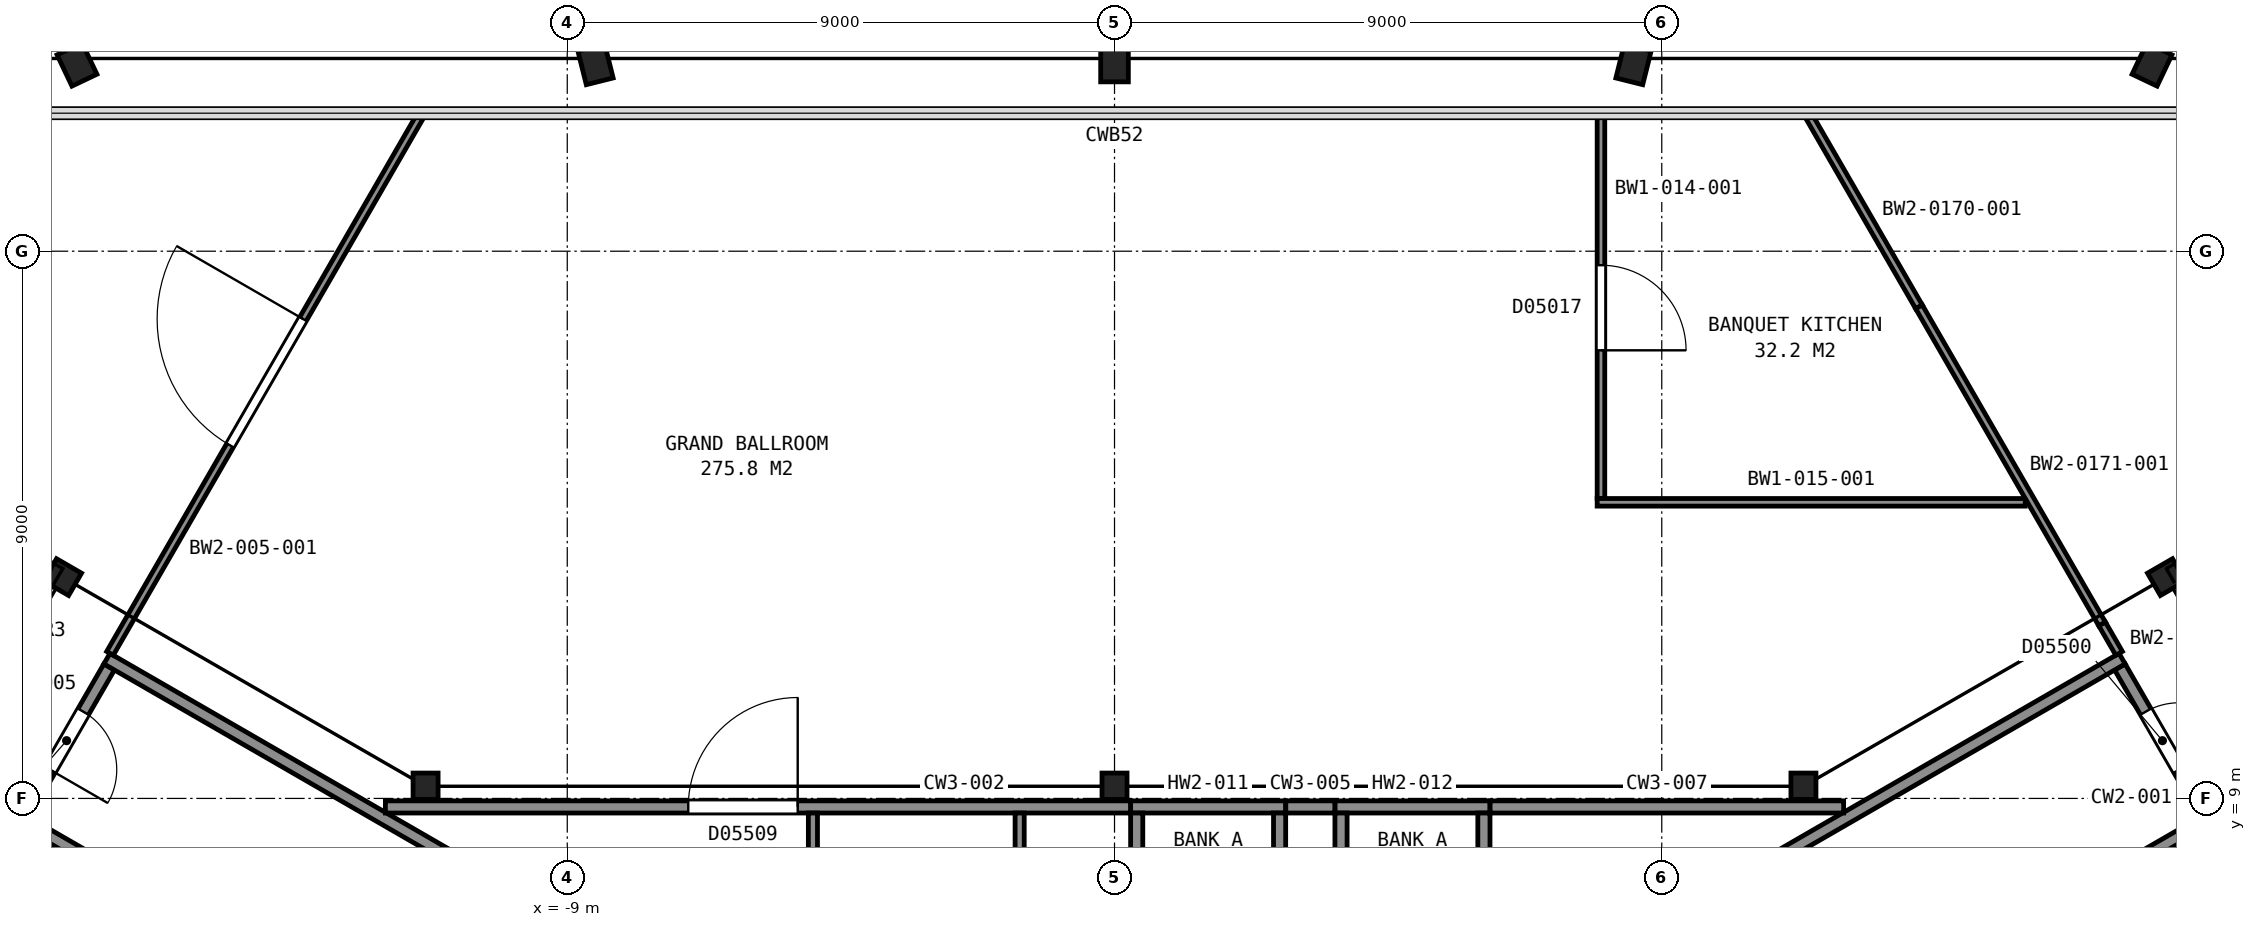
"""IFC4 building model, lengths in metres.
Left out: names, types, materials, properties, quantities, classifications, styles, units other than length and angle.
Written with IfcOpenShell. Run it as: python <this file> out.ifc"""

import sys

from ifc_helpers import new_model, si_unit, direction, frame, frame_2d, origin, origin_2d, place, context, subcontext, project, spatial, rectangle, i_section, extrude, element, fill, save


model = new_model("IFC4")
c1 = context("Model", 3, precision=1e-05, world=origin(), true_north=direction((0.0, 1.0)))
c2 = subcontext(c1, "Body", "Model", "MODEL_VIEW")
j1 = project(units=[si_unit("LENGTHUNIT", "METRE"), si_unit("PLANEANGLEUNIT", "RADIAN")], contexts=[c1])
p1 = place(None, origin())
s1 = spatial("IfcSite", under=j1, at=p1, CompositionType="ELEMENT")
p2 = place(p1, origin())
s2 = spatial("IfcBuilding", under=s1, at=p2, CompositionType="ELEMENT")
p3 = place(p2, frame((0.0, 0.0, 32.0)))
s3 = spatial("IfcBuildingStorey", under=s2, at=p3, CompositionType="ELEMENT", Elevation=32.0)
p4 = place(p3, frame((17.109, 21.167, 0.03), z_axis=(-0.039441005649, -0.082985106815, 0.995769993081), x_axis=(0.999217228346, -0.000227977802, 0.039558546511)))
e1 = element("IfcColumn", 1, at=p4, inside=s3, PredefinedType="COLUMN", context=c2, shape_type="SweptSolid", body=[
    extrude(i_section(OverallWidth=0.455, OverallDepth=0.569, WebThickness=0.078, FlangeThickness=0.125, FilletRadius=0.015, at=origin_2d()), origin(), (0.0, 0.0, 1.0), 4.76),
])
p5 = place(p3, frame((8.56, 21.168, 0.025), z_axis=(-0.020791051327, -0.083010576852, 0.996331760166), x_axis=(0.999783003146, -0.000434756363, 0.020826848233)))
e2 = element("IfcColumn", 2, at=p5, inside=s3, PredefinedType="COLUMN", context=c2, shape_type="SweptSolid", body=[
    extrude(i_section(OverallWidth=0.455, OverallDepth=0.569, WebThickness=0.078, FlangeThickness=0.125, FilletRadius=0.015, at=origin_2d()), origin(), (0.0, 0.0, 1.0), 4.768),
])
p6 = place(p3, frame((0.0, 21.168, 0.025), z_axis=(0.0, -0.083028524071, 0.996547171082), x_axis=(1.0, 0.0, 0.0)))
e3 = element("IfcColumn", 3, at=p6, inside=s3, PredefinedType="COLUMN", context=c2, shape_type="SweptSolid", body=[
    extrude(i_section(OverallWidth=0.455, OverallDepth=0.569, WebThickness=0.078, FlangeThickness=0.125, FilletRadius=0.015, at=origin_2d()), origin(), (0.0, 0.0, 1.0), 4.766),
])
p7 = place(p3, frame((-8.56, 21.168, 0.025), z_axis=(0.020791051327, -0.083010576852, 0.996331760166), x_axis=(0.999783003146, 0.000434756363, -0.020826848233)))
e4 = element("IfcColumn", 4, at=p7, inside=s3, PredefinedType="COLUMN", context=c2, shape_type="SweptSolid", body=[
    extrude(i_section(OverallWidth=0.455, OverallDepth=0.569, WebThickness=0.078, FlangeThickness=0.125, FilletRadius=0.015, at=origin_2d()), origin(), (0.0, 0.0, 1.0), 4.768),
])
p8 = place(p3, frame((-17.109, 21.167, 0.03), z_axis=(0.039441005649, -0.082985106815, 0.995769993081), x_axis=(0.999217228346, 0.000227977802, -0.039558546511)))
e5 = element("IfcColumn", 5, at=p8, inside=s3, PredefinedType="COLUMN", context=c2, shape_type="SweptSolid", body=[
    extrude(i_section(OverallWidth=0.455, OverallDepth=0.569, WebThickness=0.078, FlangeThickness=0.125, FilletRadius=0.015, at=origin_2d()), origin(), (0.0, 0.0, 1.0), 4.76),
])
p9 = place(p3, frame((17.3, 12.64, 0.0), z_axis=(0.0, 0.0, 1.0), x_axis=(0.5, -0.866025403784, 0.0)))
e6 = element("IfcColumn", 6, at=p9, inside=s3, PredefinedType="COLUMN", context=c2, shape_type="SweptSolid", body=[
    extrude(i_section(OverallWidth=0.424, OverallDepth=0.475, WebThickness=0.048, FlangeThickness=0.077, FilletRadius=0.015, at=origin_2d()), origin(), (0.0, 0.0, 1.0), 4.8),
])
for number, where, z_axis, x_axis in (
    (7, (11.33, 9.2, 0.0), (0.0, 0.0, 1.0), (1.0, 0.0, 0.0)),
    (8, (0.0, 9.2, 0.0), (0.0, 0.0, 1.0), (1.0, 0.0, 0.0)),
    (9, (-11.33, 9.2, 0.0), (0.0, 0.0, 1.0), (1.0, 0.0, 0.0)),
):
    element("IfcColumn", number, at=place(p3, frame(where, z_axis=z_axis, x_axis=x_axis)), inside=s3, PredefinedType="COLUMN", context=c2, shape_type="SweptSolid", body=[
        extrude(i_section(OverallWidth=0.411, OverallDepth=0.434, WebThickness=0.036, FlangeThickness=0.057, FilletRadius=0.015, at=origin_2d()), origin(), (0.0, 0.0, 1.0), 4.8),
    ])
p10 = place(p3, frame((-17.3, 12.64, 0.0), z_axis=(0.0, 0.0, 1.0), x_axis=(0.5, 0.866025403784, 0.0)))
e10 = element("IfcColumn", 10, at=p10, inside=s3, PredefinedType="COLUMN", context=c2, shape_type="SweptSolid", body=[
    extrude(i_section(OverallWidth=0.424, OverallDepth=0.475, WebThickness=0.048, FlangeThickness=0.077, FilletRadius=0.015, at=origin_2d()), origin(), (0.0, 0.0, 1.0), 4.8),
])
p11 = place(p3, frame((17.934, 8.738, 0.0), z_axis=(0.0, 0.0, 1.0), x_axis=(-0.49998411664, 0.866034573852, 0.0)))
e11 = element("IfcWall", 11, at=p11, inside=s3, PredefinedType="PARTITIONING", context=c2, shape_type="SweptSolid", body=[
    extrude(rectangle(XDim=2.8, YDim=0.2, at=frame_2d((1.4, 0.0))), origin(), (0.0, 0.0, 1.0), 4.55),
])
p12 = place(p11, frame((0.85, 0.0, 0.0)))
e12 = element("IfcOpeningElement", 12, at=p12, cuts=e11, PredefinedType="OPENING", context=c2, shape_type="SweptSolid", body=[
    extrude(rectangle(XDim=1.1, YDim=2.1, at=frame_2d((0.55, 1.05))), frame((0.0, 0.11, 0.0), z_axis=(0.0, -1.0, 0.0), x_axis=(1.0, 0.0, 0.0)), (0.0, 0.0, 1.0), 0.22),
])
for number, where, z_axis, x_axis in (
    (13, (6.178, 5.299, 0.0), (0.0, 0.0, 1.0), (0.866, 0.5, 0.0)),
    (14, (7.678, 2.701, 0.0), (0.0, 0.0, 1.0), (0.866, 0.5, 0.0)),
):
    element("IfcWall", number, at=place(p3, frame(where, z_axis=z_axis, x_axis=x_axis)), inside=s3, PredefinedType="PARTITIONING", context=c2, shape_type="SweptSolid", body=[
        extrude(rectangle(XDim=12.0, YDim=0.2, at=frame_2d((6.0, 0.0))), origin(), (0.0, 0.0, 1.0), 4.55),
    ])
p13 = place(p3, frame((-16.534, 11.162, 0.0), z_axis=(0.0, 0.0, 1.0), x_axis=(-0.49998411664, -0.866034573852, 0.0)))
e15 = element("IfcWall", 15, at=p13, inside=s3, PredefinedType="PARTITIONING", context=c2, shape_type="SweptSolid", body=[
    extrude(rectangle(XDim=2.8, YDim=0.2, at=frame_2d((1.4, 0.0))), origin(), (0.0, 0.0, 1.0), 4.55),
])
p14 = place(p13, frame((0.85, 0.0, 0.0)))
e16 = element("IfcOpeningElement", 16, at=p14, cuts=e15, PredefinedType="OPENING", context=c2, shape_type="SweptSolid", body=[
    extrude(rectangle(XDim=1.1, YDim=2.1, at=frame_2d((0.55, 1.05))), frame((0.0, 0.11, 0.0), z_axis=(0.0, -1.0, 0.0), x_axis=(1.0, 0.0, 0.0)), (0.0, 0.0, 1.0), 0.22),
])
for number, where, z_axis, x_axis in (
    (17, (-7.678, 2.701, 0.0), (0.0, 0.0, 1.0), (-0.866, 0.5, 0.0)),
    (18, (-6.178, 5.299, 0.0), (0.0, 0.0, 1.0), (-0.866, 0.5, 0.0)),
):
    element("IfcWall", number, at=place(p3, frame(where, z_axis=z_axis, x_axis=x_axis)), inside=s3, PredefinedType="PARTITIONING", context=c2, shape_type="SweptSolid", body=[
        extrude(rectangle(XDim=12.0, YDim=0.2, at=frame_2d((6.0, 0.0))), origin(), (0.0, 0.0, 1.0), 4.55),
    ])
for number, where, z_axis, x_axis in (
    (19, (0.265, 8.86, 0.0), (0.0, 0.0, 1.0), (1.0, 0.0, 0.0)),
    (20, (3.625, 8.86, 0.0), (0.0, 0.0, 1.0), (1.0, 0.0, 0.0)),
):
    element("IfcWall", number, at=place(p3, frame(where, z_axis=z_axis, x_axis=x_axis)), inside=s3, PredefinedType="PARTITIONING", context=c2, shape_type="SweptSolid", body=[
        extrude(rectangle(XDim=2.55, YDim=0.2, at=frame_2d((1.275, 0.0))), origin(), (0.0, 0.0, 1.0), 4.8),
    ])
for number, where, z_axis, x_axis in (
    (21, (6.075, 7.01, 0.0), (0.0, 0.0, 1.0), (0.0, 1.0, 0.0)),
    (22, (3.725, 7.01, 0.0), (0.0, 0.0, 1.0), (0.0, 1.0, 0.0)),
    (23, (2.715, 7.01, 0.0), (0.0, 0.0, 1.0), (0.0, 1.0, 0.0)),
    (24, (0.365, 7.01, 0.0), (0.0, 0.0, 1.0), (0.0, 1.0, 0.0)),
):
    element("IfcWall", number, at=place(p3, frame(where, z_axis=z_axis, x_axis=x_axis)), inside=s3, PredefinedType="PARTITIONING", context=c2, shape_type="SweptSolid", body=[
        extrude(rectangle(XDim=1.75, YDim=0.2, at=frame_2d((0.875, 0.0))), origin(), (0.0, 0.0, 1.0), 4.8),
    ])
p15 = place(p3, frame((0.263, 8.86, 0.0), z_axis=(0.0, 0.0, 1.0), x_axis=(-1.0, 0.0, 0.0)))
e25 = element("IfcWall", 25, at=p15, inside=s3, PredefinedType="PARTITIONING", context=c2, shape_type="SweptSolid", body=[
    extrude(rectangle(XDim=12.254, YDim=0.2, at=frame_2d((6.127, 0.0))), origin(), (0.0, 0.0, 1.0), 4.55),
])
p16 = place(p15, frame((5.473, 0.0, 0.0)))
e26 = element("IfcOpeningElement", 26, at=p16, cuts=e25, PredefinedType="OPENING", context=c2, shape_type="SweptSolid", body=[
    extrude(rectangle(XDim=1.8, YDim=2.1, at=frame_2d((0.9, 1.05))), frame((0.0, 0.11, 0.0), z_axis=(0.0, -1.0, 0.0), x_axis=(1.0, 0.0, 0.0)), (0.0, 0.0, 1.0), 0.22),
])
p17 = place(p3, frame((-4.96, 7.762, 0.0), z_axis=(0.0, 0.0, 1.0), x_axis=(0.0, 1.0, 0.0)))
e27 = element("IfcWall", 27, at=p17, inside=s3, PredefinedType="PARTITIONING", context=c2, shape_type="SweptSolid", body=[
    extrude(rectangle(XDim=0.998, YDim=0.15, at=frame_2d((0.499, 0.0))), origin(), (0.0, 0.0, 1.0), 4.55),
])
p18 = place(p3, frame((-1.56, 6.635, 0.0), z_axis=(0.0, 0.0, 1.0), x_axis=(0.0, 1.0, 0.0)))
e28 = element("IfcWall", 28, at=p18, inside=s3, PredefinedType="PARTITIONING", context=c2, shape_type="SweptSolid", body=[
    extrude(rectangle(XDim=2.125, YDim=0.15, at=frame_2d((1.062, 0.0))), origin(), (0.0, 0.0, 1.0), 4.55),
])
p19 = place(p18, frame((0.625, 0.0, 0.0)))
e29 = element("IfcOpeningElement", 29, at=p19, cuts=e28, PredefinedType="OPENING", context=c2, shape_type="SweptSolid", body=[
    extrude(rectangle(XDim=0.9, YDim=2.1, at=frame_2d((0.45, 1.05))), frame((0.0, 0.085, 0.0), z_axis=(0.0, -1.0, 0.0), x_axis=(1.0, 0.0, 0.0)), (0.0, 0.0, 1.0), 0.17),
])
p20 = place(p3, frame((2.817, 8.86, 0.0), z_axis=(0.0, 0.0, 1.0), x_axis=(1.0, 0.0, 0.0)))
e30 = element("IfcWall", 30, at=p20, inside=s3, PredefinedType="PARTITIONING", context=c2, shape_type="SweptSolid", body=[
    extrude(rectangle(XDim=0.806, YDim=0.2, at=frame_2d((0.403, 0.0))), origin(), (0.0, 0.0, 1.0), 4.55),
])
p21 = place(p3, frame((6.177, 8.86, 0.0), z_axis=(0.0, 0.0, 1.0), x_axis=(1.0, 0.0, 0.0)))
e31 = element("IfcWall", 31, at=p21, inside=s3, PredefinedType="PARTITIONING", context=c2, shape_type="SweptSolid", body=[
    extrude(rectangle(XDim=5.814, YDim=0.2, at=frame_2d((2.907, 0.0))), origin(), (0.0, 0.0, 1.0), 4.55),
])
p22 = place(p3, frame((-11.391, 20.27, 0.0), z_axis=(0.0, 0.0, 1.0), x_axis=(-0.499978599175, -0.866037759204, 0.0)))
e32 = element("IfcWall", 32, at=p22, inside=s3, PredefinedType="PARTITIONING", context=c2, shape_type="SweptSolid", body=[
    extrude(rectangle(XDim=10.258, YDim=0.125, at=frame_2d((5.129, 0.0))), origin(), (0.0, 0.0, 1.0), 3.793),
])
p23 = place(p22, frame((3.908, 0.0, 0.0)))
e33 = element("IfcOpeningElement", 33, at=p23, cuts=e32, PredefinedType="OPENING", context=c2, shape_type="SweptSolid", body=[
    extrude(rectangle(XDim=2.4, YDim=2.4, at=frame_2d((1.2, 1.2))), frame((0.0, 0.073, 0.0), z_axis=(0.0, -1.0, 0.0), x_axis=(1.0, 0.0, 0.0)), (0.0, 0.0, 1.0), 0.145),
])
p24 = place(p3, frame((8.0, 20.27, 0.0), z_axis=(0.0, 0.0, 1.0), x_axis=(0.0, -1.0, 0.0)))
e34 = element("IfcWall", 34, at=p24, inside=s3, PredefinedType="PARTITIONING", context=c2, shape_type="SweptSolid", body=[
    extrude(rectangle(XDim=6.335, YDim=0.125, at=frame_2d((3.167, 0.0))), origin(), (0.0, 0.0, 1.0), 4.64),
])
p25 = place(p24, frame((2.5, 0.0, 0.0)))
e35 = element("IfcOpeningElement", 35, at=p25, cuts=e34, PredefinedType="OPENING", context=c2, shape_type="SweptSolid", body=[
    extrude(rectangle(XDim=1.4, YDim=2.1, at=frame_2d((0.7, 1.05))), frame((0.0, 0.073, 0.0), z_axis=(0.0, -1.0, 0.0), x_axis=(1.0, 0.0, 0.0)), (0.0, 0.0, 1.0), 0.145),
])
p26 = place(p3, frame((7.938, 13.87, 0.0), z_axis=(0.0, 0.0, 1.0), x_axis=(1.0, 0.0, 0.0)))
e36 = element("IfcWall", 36, at=p26, inside=s3, PredefinedType="PARTITIONING", context=c2, shape_type="SweptSolid", body=[
    extrude(rectangle(XDim=7.04, YDim=0.125, at=frame_2d((3.52, 0.0))), origin(), (0.0, 0.0, 1.0), 4.64),
])
p27 = place(p3, frame((11.391, 20.27, 0.0), z_axis=(0.0, 0.0, 1.0), x_axis=(0.500036521051, -0.866004317319, 0.0)))
e37 = element("IfcWall", 37, at=p27, inside=s3, PredefinedType="PARTITIONING", context=c2, shape_type="SweptSolid", body=[
    extrude(rectangle(XDim=3.678, YDim=0.125, at=frame_2d((1.839, 0.0))), origin(), (0.0, 0.0, 1.0), 4.64),
])
p28 = place(p3, frame((13.23, 17.084, 0.0), z_axis=(0.0, 0.0, 1.0), x_axis=(0.500062816623, -0.865989133553, 0.0)))
e38 = element("IfcWall", 38, at=p28, inside=s3, PredefinedType="PARTITIONING", context=c2, shape_type="SweptSolid", body=[
    extrude(rectangle(XDim=6.023, YDim=0.125, at=frame_2d((3.011, 0.0))), origin(), (0.0, 0.0, 1.0), 3.793),
])
p29 = place(p3, frame((16.242, 11.869, 0.0), z_axis=(0.0, 0.0, 1.0), x_axis=(0.500000383388, -0.866025182435, 0.0)))
e39 = element("IfcWall", 39, at=p29, inside=s3, PredefinedType="PARTITIONING", context=c2, shape_type="SweptSolid", body=[
    extrude(rectangle(XDim=0.558, YDim=0.125, at=frame_2d((0.279, 0.0))), origin(), (0.0, 0.0, 1.0), 4.64),
])
p30 = place(p12, origin())
e40 = element("IfcDoor", 40, at=p30, inside=s3, OperationType="SINGLE_SWING_LEFT", PredefinedType="DOOR", context=c2, shape_type="SweptSolid", body=[
    extrude(rectangle(XDim=1.1, YDim=2.1, at=frame_2d((0.55, 1.05))), frame((0.0, 0.025, 0.0), z_axis=(0.0, -1.0, 0.0), x_axis=(1.0, 0.0, 0.0)), (0.0, 0.0, 1.0), 0.05),
])
fill(e12, e40)
p31 = place(p14, origin())
e41 = element("IfcDoor", 41, at=p31, inside=s3, OperationType="SINGLE_SWING_RIGHT", PredefinedType="DOOR", context=c2, shape_type="SweptSolid", body=[
    extrude(rectangle(XDim=1.1, YDim=2.1, at=frame_2d((0.55, 1.05))), frame((0.0, 0.025, 0.0), z_axis=(0.0, -1.0, 0.0), x_axis=(1.0, 0.0, 0.0)), (0.0, 0.0, 1.0), 0.05),
])
fill(e16, e41)
p32 = place(p16, origin())
e42 = element("IfcDoor", 42, at=p32, inside=s3, OperationType="DOUBLE_DOOR_SINGLE_SWING", PredefinedType="DOOR", context=c2, shape_type="SweptSolid", body=[
    extrude(rectangle(XDim=1.8, YDim=2.1, at=frame_2d((0.9, 1.05))), frame((0.0, 0.025, 0.0), z_axis=(0.0, -1.0, 0.0), x_axis=(1.0, 0.0, 0.0)), (0.0, 0.0, 1.0), 0.05),
])
fill(e26, e42)
p33 = place(p23, origin())
e43 = element("IfcDoor", 43, at=p33, inside=s3, OperationType="DOUBLE_DOOR_SINGLE_SWING", PredefinedType="DOOR", context=c2, shape_type="SweptSolid", body=[
    extrude(rectangle(XDim=2.4, YDim=2.4, at=frame_2d((1.2, 1.2))), frame((0.0, 0.025, 0.0), z_axis=(0.0, -1.0, 0.0), x_axis=(1.0, 0.0, 0.0)), (0.0, 0.0, 1.0), 0.05),
])
fill(e33, e43)
p34 = place(p25, origin())
e44 = element("IfcDoor", 44, at=p34, inside=s3, OperationType="SINGLE_SWING_RIGHT", PredefinedType="DOOR", context=c2, shape_type="SweptSolid", body=[
    extrude(rectangle(XDim=1.4, YDim=2.1, at=frame_2d((0.7, 1.05))), frame((0.0, 0.025, 0.0), z_axis=(0.0, -1.0, 0.0), x_axis=(1.0, 0.0, 0.0)), (0.0, 0.0, 1.0), 0.05),
])
fill(e35, e44)
save(model, sys.argv[1])
